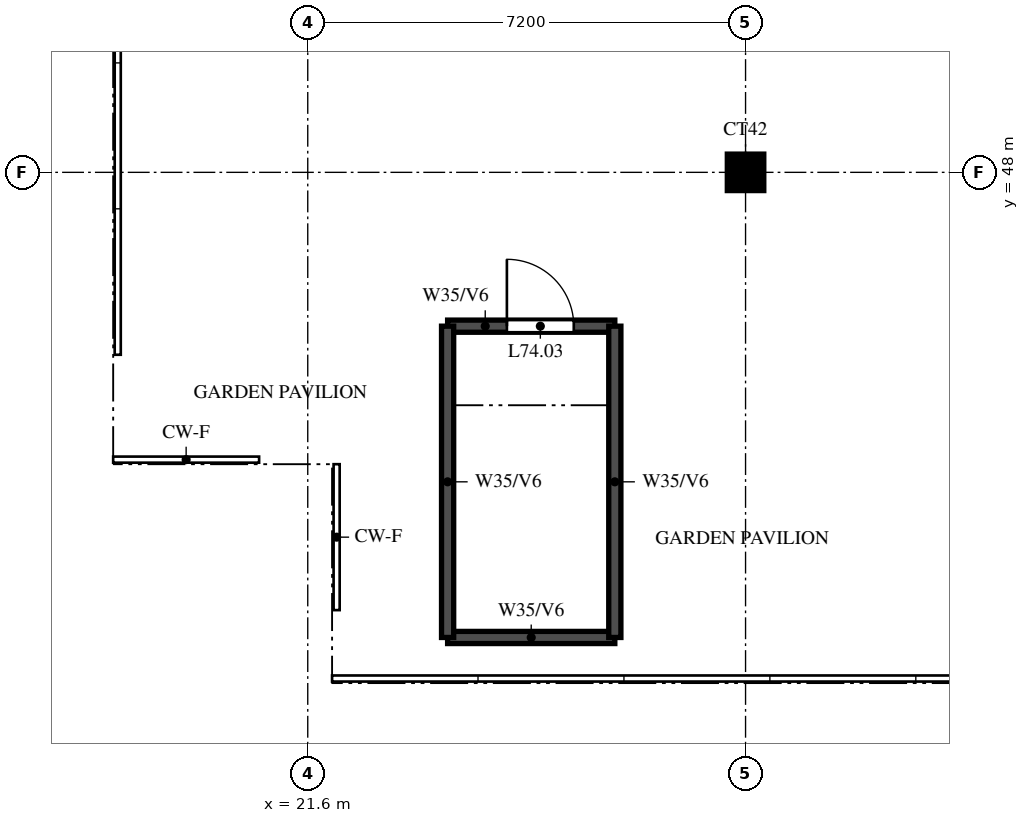
"""IFC4 building model, lengths in metres.
Left out: names, types, materials, properties, quantities, classifications, styles, units other than length and angle.
Written with IfcOpenShell. Run it as: python <this file> out.ifc"""

import sys

from ifc_helpers import new_model, si_unit, direction, frame, frame_2d, origin, origin_2d, place, context, subcontext, project, spatial, rectangle, extrude, source, transform, mapped, element, fill, save


model = new_model("IFC4")
c1 = context("Model", 3, precision=1e-05, world=origin(), true_north=direction((0.0, 1.0)))
c2 = subcontext(c1, "Body", "Model", "MODEL_VIEW")
j1 = project(units=[si_unit("LENGTHUNIT", "METRE"), si_unit("PLANEANGLEUNIT", "RADIAN")], contexts=[c1])
p1 = place(None, origin())
s1 = spatial("IfcSite", under=j1, at=p1, CompositionType="ELEMENT")
p2 = place(p1, origin())
s2 = spatial("IfcBuilding", under=s1, at=p2, CompositionType="ELEMENT")
p3 = place(p2, frame((0.0, 0.0, 274.5)))
s3 = spatial("IfcBuildingStorey", under=s2, at=p3, CompositionType="ELEMENT", Elevation=274.5)
m1 = source(origin(), c2, "Body", "SweptSolid", [
    extrude(rectangle(XDim=0.6, YDim=0.6, at=origin_2d()), origin(), (0.0, 0.0, 1.0), 7.0),
])
p4 = place(p3, frame((28.8, 48.0, 0.0), z_axis=(0.0, 0.0, 1.0), x_axis=(1.0, 0.0, 0.0)))
e1 = element("IfcColumn", 1, at=p4, inside=s3, PredefinedType="COLUMN", context=c2, shape_type="MappedRepresentation", body=[
    mapped(m1, transform((0.0, 0.0, 0.0))),
])
p5 = place(p3, frame((23.9, 40.35, 0.0), z_axis=(0.0, 0.0, 1.0), x_axis=(1.0, 0.0, 0.0)))
e2 = element("IfcWall", 2, at=p5, inside=s3, PredefinedType="SOLIDWALL", context=c2, shape_type="SweptSolid", body=[
    extrude(rectangle(XDim=2.75, YDim=0.2, at=frame_2d((1.375, 0.0))), origin(), (0.0, 0.0, 1.0), 7.0),
])
p6 = place(p3, frame((23.9, 45.47, 0.0), z_axis=(0.0, 0.0, 1.0), x_axis=(1.0, 0.0, 0.0)))
e3 = element("IfcWall", 3, at=p6, inside=s3, PredefinedType="SOLIDWALL", context=c2, shape_type="SweptSolid", body=[
    extrude(rectangle(XDim=2.75, YDim=0.2, at=frame_2d((1.375, 0.0))), origin(), (0.0, 0.0, 1.0), 7.0),
])
p7 = place(p6, frame((0.975, 0.0, 0.0)))
e4 = element("IfcOpeningElement", 4, at=p7, cuts=e3, PredefinedType="OPENING", context=c2, shape_type="SweptSolid", body=[
    extrude(rectangle(XDim=1.1, YDim=2.1, at=frame_2d((0.55, 1.05))), frame((0.0, 0.11, 0.0), z_axis=(0.0, -1.0, 0.0), x_axis=(1.0, 0.0, 0.0)), (0.0, 0.0, 1.0), 0.22),
])
for number, where, z_axis, x_axis in (
    (5, (23.9, 40.35, 0.0), (0.0, 0.0, 1.0), (0.0, 1.0, 0.0)),
    (6, (26.65, 40.35, 0.0), (0.0, 0.0, 1.0), (0.0, 1.0, 0.0)),
):
    element("IfcWall", number, at=place(p3, frame(where, z_axis=z_axis, x_axis=x_axis)), inside=s3, PredefinedType="SOLIDWALL", context=c2, shape_type="SweptSolid", body=[
        extrude(rectangle(XDim=5.12, YDim=0.2, at=frame_2d((2.56, 0.0))), origin(), (0.0, 0.0, 1.0), 7.0),
    ])
p8 = place(p7, origin())
e7 = element("IfcDoor", 7, at=p8, inside=s3, OperationType="SINGLE_SWING_RIGHT", PredefinedType="DOOR", context=c2, shape_type="SweptSolid", body=[
    extrude(rectangle(XDim=1.1, YDim=2.1, at=frame_2d((0.55, 1.05))), frame((0.0, 0.025, 0.0), z_axis=(0.0, -1.0, 0.0), x_axis=(1.0, 0.0, 0.0)), (0.0, 0.0, 1.0), 0.05),
])
fill(e4, e7)
save(model, sys.argv[1])
